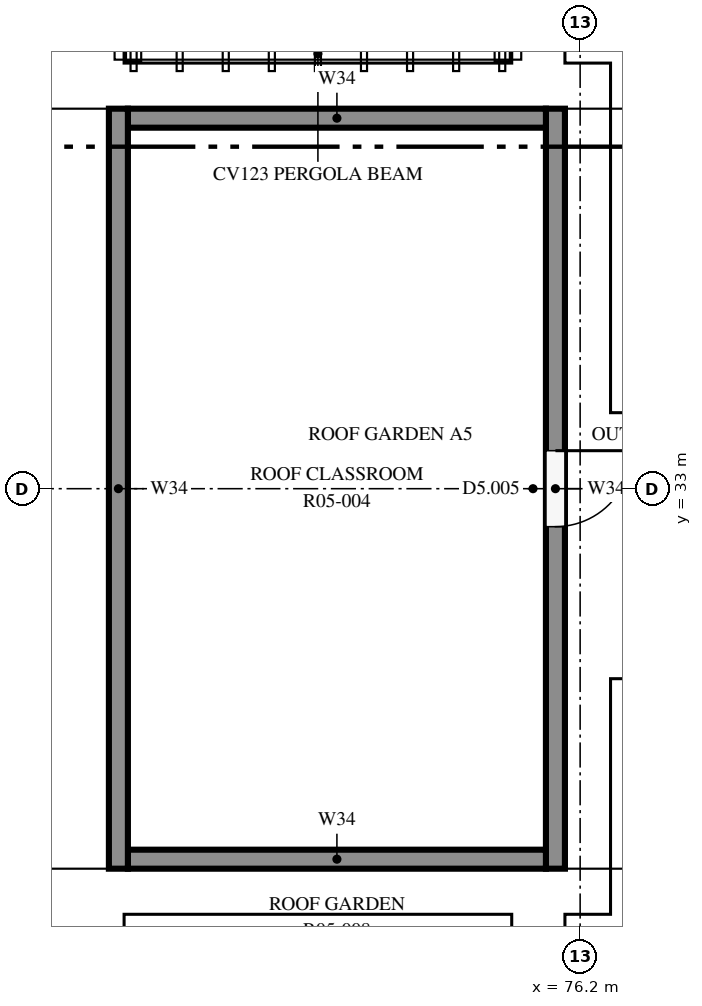
"""IFC4 building model, lengths in metres.
Left out: names, types, materials, properties, quantities, classifications, styles, units other than length and angle.
Written with IfcOpenShell. Run it as: python <this file> out.ifc"""

import sys

from ifc_helpers import new_model, si_unit, direction, frame, frame_2d, origin, place, context, subcontext, project, spatial, rectangle, extrude, element, fill, save


model = new_model("IFC4")
c1 = context("Model", 3, precision=1e-05, world=origin(), true_north=direction((0.0, 1.0)))
c2 = subcontext(c1, "Body", "Model", "MODEL_VIEW")
j1 = project(units=[si_unit("LENGTHUNIT", "METRE"), si_unit("PLANEANGLEUNIT", "RADIAN")], contexts=[c1])
p1 = place(None, origin())
s1 = spatial("IfcSite", under=j1, at=p1, CompositionType="ELEMENT")
p2 = place(p1, origin())
s2 = spatial("IfcBuilding", under=s1, at=p2, CompositionType="ELEMENT")
p3 = place(p2, frame((0.0, 0.0, 18.9)))
s3 = spatial("IfcBuildingStorey", under=s2, at=p3, CompositionType="ELEMENT", Elevation=18.9)
p4 = place(p3, frame((70.125, 28.0, 0.0), z_axis=(0.0, 0.0, 1.0), x_axis=(0.0, 1.0, 0.0)))
e1 = element("IfcWall", 1, at=p4, inside=s3, PredefinedType="SOLIDWALL", context=c2, shape_type="SweptSolid", body=[
    extrude(rectangle(XDim=10.0, YDim=0.25, at=frame_2d((5.0, 0.0))), origin(), (0.0, 0.0, 1.0), 2.6),
])
p5 = place(p3, frame((75.875, 38.0, 0.0), z_axis=(0.0, 0.0, 1.0), x_axis=(0.0, -1.0, 0.0)))
e2 = element("IfcWall", 2, at=p5, inside=s3, PredefinedType="SOLIDWALL", context=c2, shape_type="SweptSolid", body=[
    extrude(rectangle(XDim=10.0, YDim=0.25, at=frame_2d((5.0, 0.0))), origin(), (0.0, 0.0, 1.0), 2.6),
])
p6 = place(p5, frame((4.5, 0.0, 0.0)))
e3 = element("IfcOpeningElement", 3, at=p6, cuts=e2, PredefinedType="OPENING", context=c2, shape_type="SweptSolid", body=[
    extrude(rectangle(XDim=1.0, YDim=2.1, at=frame_2d((0.5, 1.05))), frame((0.0, 0.135, 0.0), z_axis=(0.0, -1.0, 0.0), x_axis=(1.0, 0.0, 0.0)), (0.0, 0.0, 1.0), 0.27),
])
for number, where, z_axis, x_axis in (
    (4, (70.25, 28.125, 0.0), (0.0, 0.0, 1.0), (1.0, 0.0, 0.0)),
    (5, (70.25, 37.875, 0.0), (0.0, 0.0, 1.0), (1.0, 0.0, 0.0)),
):
    element("IfcWall", number, at=place(p3, frame(where, z_axis=z_axis, x_axis=x_axis)), inside=s3, PredefinedType="SOLIDWALL", context=c2, shape_type="SweptSolid", body=[
        extrude(rectangle(XDim=5.5, YDim=0.25, at=frame_2d((2.75, 0.0))), origin(), (0.0, 0.0, 1.0), 2.6),
    ])
p7 = place(p6, origin())
e6 = element("IfcDoor", 6, at=p7, inside=s3, OperationType="SINGLE_SWING_LEFT", PredefinedType="DOOR", context=c2, shape_type="SweptSolid", body=[
    extrude(rectangle(XDim=1.0, YDim=2.1, at=frame_2d((0.5, 1.05))), frame((0.0, 0.025, 0.0), z_axis=(0.0, -1.0, 0.0), x_axis=(1.0, 0.0, 0.0)), (0.0, 0.0, 1.0), 0.05),
])
fill(e3, e6)
save(model, sys.argv[1])
